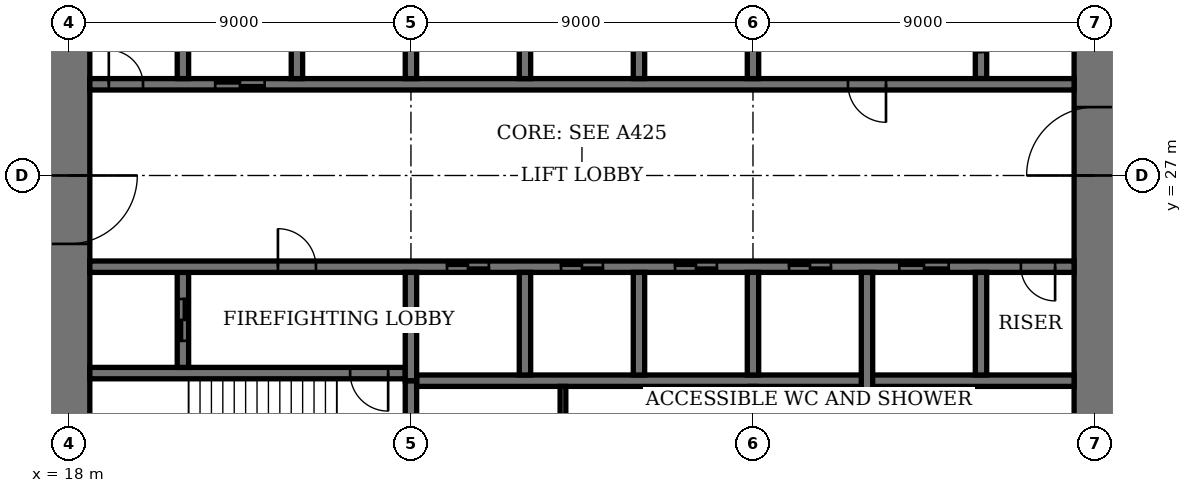
"""IFC4 building model, lengths in metres.
Left out: names, types, materials, properties, quantities, classifications, styles, units other than length and angle.
Written with IfcOpenShell. Run it as: python <this file> out.ifc"""

import sys

from ifc_helpers import new_model, si_unit, direction, frame, frame_2d, origin, place, context, subcontext, project, spatial, rectangle, extrude, element, fill, save


model = new_model("IFC4")
c1 = context("Model", 3, precision=1e-05, world=origin(), true_north=direction((0.0, 1.0)))
c2 = subcontext(c1, "Body", "Model", "MODEL_VIEW")
j1 = project(units=[si_unit("LENGTHUNIT", "METRE"), si_unit("PLANEANGLEUNIT", "RADIAN")], contexts=[c1])
p1 = place(None, origin())
s1 = spatial("IfcSite", under=j1, at=p1, CompositionType="ELEMENT")
p2 = place(p1, origin())
s2 = spatial("IfcBuilding", under=s1, at=p2, CompositionType="ELEMENT")
p3 = place(p2, frame((0.0, 0.0, 19.8)))
s3 = spatial("IfcBuildingStorey", under=s2, at=p3, CompositionType="ELEMENT", Elevation=19.8)
p4 = place(p3, frame((18.0, 35.45, 0.0), z_axis=(0.0, 0.0, 1.0), x_axis=(0.0, -1.0, 0.0)))
e1 = element("IfcWall", 1, at=p4, inside=s3, PredefinedType="SHEAR", context=c2, shape_type="SweptSolid", body=[
    extrude(rectangle(XDim=16.9, YDim=1.1, at=frame_2d((8.45, 0.0))), origin(), (0.0, 0.0, 1.0), 4.0),
])
p5 = place(p4, frame((8.45, 0.0, 0.0)))
e2 = element("IfcOpeningElement", 2, at=p5, cuts=e1, PredefinedType="OPENING", context=c2, shape_type="SweptSolid", body=[
    extrude(rectangle(XDim=1.8, YDim=2.4, at=frame_2d((0.9, 1.2))), frame((0.0, 0.56, 0.0), z_axis=(0.0, -1.0, 0.0), x_axis=(1.0, 0.0, 0.0)), (0.0, 0.0, 1.0), 1.12),
])
p6 = place(p3, frame((45.0, 18.55, 0.0), z_axis=(0.0, 0.0, 1.0), x_axis=(0.0, 1.0, 0.0)))
e3 = element("IfcWall", 3, at=p6, inside=s3, PredefinedType="SHEAR", context=c2, shape_type="SweptSolid", body=[
    extrude(rectangle(XDim=16.9, YDim=1.1, at=frame_2d((8.45, 0.0))), origin(), (0.0, 0.0, 1.0), 4.0),
])
p7 = place(p6, frame((8.45, 0.0, 0.0)))
e4 = element("IfcOpeningElement", 4, at=p7, cuts=e3, PredefinedType="OPENING", context=c2, shape_type="SweptSolid", body=[
    extrude(rectangle(XDim=1.8, YDim=2.4, at=frame_2d((0.9, 1.2))), frame((0.0, 0.56, 0.0), z_axis=(0.0, -1.0, 0.0), x_axis=(1.0, 0.0, 0.0)), (0.0, 0.0, 1.0), 1.12),
])
p8 = place(p3, frame((18.55, 21.8, 0.0), z_axis=(0.0, 0.0, 1.0), x_axis=(1.0, 0.0, 0.0)))
e5 = element("IfcWall", 5, at=p8, inside=s3, PredefinedType="SHEAR", context=c2, shape_type="SweptSolid", body=[
    extrude(rectangle(XDim=8.3, YDim=0.3, at=frame_2d((4.15, 0.0))), origin(), (0.0, 0.0, 1.0), 4.0),
])
p9 = place(p8, frame((6.85, 0.0, 0.0)))
e6 = element("IfcOpeningElement", 6, at=p9, cuts=e5, PredefinedType="OPENING", context=c2, shape_type="SweptSolid", body=[
    extrude(rectangle(XDim=1.0, YDim=2.4, at=frame_2d((0.5, 1.2))), frame((0.0, 0.16, 0.0), z_axis=(0.0, -1.0, 0.0), x_axis=(1.0, 0.0, 0.0)), (0.0, 0.0, 1.0), 0.32),
])
p10 = place(p3, frame((27.0, 18.55, 0.0), z_axis=(0.0, 0.0, 1.0), x_axis=(0.0, 1.0, 0.0)))
e7 = element("IfcWall", 7, at=p10, inside=s3, PredefinedType="SHEAR", context=c2, shape_type="SweptSolid", body=[
    extrude(rectangle(XDim=3.05, YDim=0.3, at=frame_2d((1.525, 0.0))), origin(), (0.0, 0.0, 1.0), 4.0),
])
p11 = place(p3, frame((21.0, 21.95, 0.0), z_axis=(0.0, 0.0, 1.0), x_axis=(0.0, 1.0, 0.0)))
e8 = element("IfcWall", 8, at=p11, inside=s3, PredefinedType="SHEAR", context=c2, shape_type="SweptSolid", body=[
    extrude(rectangle(XDim=2.5, YDim=0.3, at=frame_2d((1.25, 0.0))), origin(), (0.0, 0.0, 1.0), 4.0),
])
p12 = place(p11, frame((0.7, 0.0, 0.0)))
e9 = element("IfcOpeningElement", 9, at=p12, cuts=e8, PredefinedType="OPENING", context=c2, shape_type="SweptSolid", body=[
    extrude(rectangle(XDim=1.1, YDim=2.4, at=frame_2d((0.55, 1.2))), frame((0.0, 0.16, 0.0), z_axis=(0.0, -1.0, 0.0), x_axis=(1.0, 0.0, 0.0)), (0.0, 0.0, 1.0), 0.32),
])
p13 = place(p3, frame((42.0, 29.55, 0.0), z_axis=(0.0, 0.0, 1.0), x_axis=(0.0, 1.0, 0.0)))
e10 = element("IfcWall", 10, at=p13, inside=s3, PredefinedType="SHEAR", context=c2, shape_type="SweptSolid", body=[
    extrude(rectangle(XDim=2.5, YDim=0.3, at=frame_2d((1.25, 0.0))), origin(), (0.0, 0.0, 1.0), 4.0),
])
p14 = place(p13, frame((0.7, 0.0, 0.0)))
e11 = element("IfcOpeningElement", 11, at=p14, cuts=e10, PredefinedType="OPENING", context=c2, shape_type="SweptSolid", body=[
    extrude(rectangle(XDim=1.1, YDim=2.4, at=frame_2d((0.55, 1.2))), frame((0.0, 0.16, 0.0), z_axis=(0.0, -1.0, 0.0), x_axis=(1.0, 0.0, 0.0)), (0.0, 0.0, 1.0), 0.32),
])
p15 = place(p3, frame((18.55, 24.6, 0.0), z_axis=(0.0, 0.0, 1.0), x_axis=(1.0, 0.0, 0.0)))
e12 = element("IfcWall", 12, at=p15, inside=s3, PredefinedType="SHEAR", context=c2, shape_type="SweptSolid", body=[
    extrude(rectangle(XDim=25.9, YDim=0.3, at=frame_2d((12.95, 0.0))), origin(), (0.0, 0.0, 1.0), 4.0),
])
p16 = place(p15, frame((4.95, 0.0, 0.0)))
e13 = element("IfcOpeningElement", 13, at=p16, cuts=e12, PredefinedType="OPENING", context=c2, shape_type="SweptSolid", body=[
    extrude(rectangle(XDim=1.0, YDim=2.4, at=frame_2d((0.5, 1.2))), frame((0.0, 0.16, 0.0), z_axis=(0.0, -1.0, 0.0), x_axis=(1.0, 0.0, 0.0)), (0.0, 0.0, 1.0), 0.32),
])
p17 = place(p15, frame((24.5, 0.0, 0.0)))
e14 = element("IfcOpeningElement", 14, at=p17, cuts=e12, PredefinedType="OPENING", context=c2, shape_type="SweptSolid", body=[
    extrude(rectangle(XDim=0.9, YDim=2.1, at=frame_2d((0.45, 1.05))), frame((0.0, 0.16, 0.0), z_axis=(0.0, -1.0, 0.0), x_axis=(1.0, 0.0, 0.0)), (0.0, 0.0, 1.0), 0.32),
])
p18 = place(p15, frame((9.4, 0.0, 0.0)))
e15 = element("IfcOpeningElement", 15, at=p18, cuts=e12, PredefinedType="OPENING", context=c2, shape_type="SweptSolid", body=[
    extrude(rectangle(XDim=1.1, YDim=2.4, at=frame_2d((0.55, 1.2))), frame((0.0, 0.16, 0.0), z_axis=(0.0, -1.0, 0.0), x_axis=(1.0, 0.0, 0.0)), (0.0, 0.0, 1.0), 0.32),
])
p19 = place(p15, frame((12.4, 0.0, 0.0)))
e16 = element("IfcOpeningElement", 16, at=p19, cuts=e12, PredefinedType="OPENING", context=c2, shape_type="SweptSolid", body=[
    extrude(rectangle(XDim=1.1, YDim=2.4, at=frame_2d((0.55, 1.2))), frame((0.0, 0.16, 0.0), z_axis=(0.0, -1.0, 0.0), x_axis=(1.0, 0.0, 0.0)), (0.0, 0.0, 1.0), 0.32),
])
p20 = place(p15, frame((15.4, 0.0, 0.0)))
e17 = element("IfcOpeningElement", 17, at=p20, cuts=e12, PredefinedType="OPENING", context=c2, shape_type="SweptSolid", body=[
    extrude(rectangle(XDim=1.1, YDim=2.4, at=frame_2d((0.55, 1.2))), frame((0.0, 0.16, 0.0), z_axis=(0.0, -1.0, 0.0), x_axis=(1.0, 0.0, 0.0)), (0.0, 0.0, 1.0), 0.32),
])
p21 = place(p15, frame((18.4, 0.0, 0.0)))
e18 = element("IfcOpeningElement", 18, at=p21, cuts=e12, PredefinedType="OPENING", context=c2, shape_type="SweptSolid", body=[
    extrude(rectangle(XDim=1.1, YDim=2.4, at=frame_2d((0.55, 1.2))), frame((0.0, 0.16, 0.0), z_axis=(0.0, -1.0, 0.0), x_axis=(1.0, 0.0, 0.0)), (0.0, 0.0, 1.0), 0.32),
])
p22 = place(p15, frame((21.3, 0.0, 0.0)))
e19 = element("IfcOpeningElement", 19, at=p22, cuts=e12, PredefinedType="OPENING", context=c2, shape_type="SweptSolid", body=[
    extrude(rectangle(XDim=1.3, YDim=2.4, at=frame_2d((0.65, 1.2))), frame((0.0, 0.16, 0.0), z_axis=(0.0, -1.0, 0.0), x_axis=(1.0, 0.0, 0.0)), (0.0, 0.0, 1.0), 0.32),
])
p23 = place(p3, frame((18.55, 29.4, 0.0), z_axis=(0.0, 0.0, 1.0), x_axis=(1.0, 0.0, 0.0)))
e20 = element("IfcWall", 20, at=p23, inside=s3, PredefinedType="SHEAR", context=c2, shape_type="SweptSolid", body=[
    extrude(rectangle(XDim=25.9, YDim=0.3, at=frame_2d((12.95, 0.0))), origin(), (0.0, 0.0, 1.0), 4.0),
])
p24 = place(p23, frame((19.95, 0.0, 0.0)))
e21 = element("IfcOpeningElement", 21, at=p24, cuts=e20, PredefinedType="OPENING", context=c2, shape_type="SweptSolid", body=[
    extrude(rectangle(XDim=1.0, YDim=2.4, at=frame_2d((0.5, 1.2))), frame((0.0, 0.16, 0.0), z_axis=(0.0, -1.0, 0.0), x_axis=(1.0, 0.0, 0.0)), (0.0, 0.0, 1.0), 0.32),
])
p25 = place(p23, frame((0.5, 0.0, 0.0)))
e22 = element("IfcOpeningElement", 22, at=p25, cuts=e20, PredefinedType="OPENING", context=c2, shape_type="SweptSolid", body=[
    extrude(rectangle(XDim=0.9, YDim=2.1, at=frame_2d((0.45, 1.05))), frame((0.0, 0.16, 0.0), z_axis=(0.0, -1.0, 0.0), x_axis=(1.0, 0.0, 0.0)), (0.0, 0.0, 1.0), 0.32),
])
p26 = place(p23, frame((3.3, 0.0, 0.0)))
e23 = element("IfcOpeningElement", 23, at=p26, cuts=e20, PredefinedType="OPENING", context=c2, shape_type="SweptSolid", body=[
    extrude(rectangle(XDim=1.3, YDim=2.4, at=frame_2d((0.65, 1.2))), frame((0.0, 0.16, 0.0), z_axis=(0.0, -1.0, 0.0), x_axis=(1.0, 0.0, 0.0)), (0.0, 0.0, 1.0), 0.32),
])
p27 = place(p3, frame((27.15, 21.6, 0.0), z_axis=(0.0, 0.0, 1.0), x_axis=(1.0, 0.0, 0.0)))
e24 = element("IfcWall", 24, at=p27, inside=s3, PredefinedType="SHEAR", context=c2, shape_type="SweptSolid", body=[
    extrude(rectangle(XDim=17.3, YDim=0.3, at=frame_2d((8.65, 0.0))), origin(), (0.0, 0.0, 1.0), 4.0),
])
for number, where, z_axis, x_axis in (
    (25, (30.0, 21.75, 0.0), (0.0, 0.0, 1.0), (0.0, 1.0, 0.0)),
    (26, (33.0, 29.55, 0.0), (0.0, 0.0, 1.0), (0.0, 1.0, 0.0)),
    (27, (33.0, 21.75, 0.0), (0.0, 0.0, 1.0), (0.0, 1.0, 0.0)),
    (28, (30.0, 29.55, 0.0), (0.0, 0.0, 1.0), (0.0, 1.0, 0.0)),
    (29, (36.0, 21.75, 0.0), (0.0, 0.0, 1.0), (0.0, 1.0, 0.0)),
    (30, (27.0, 29.55, 0.0), (0.0, 0.0, 1.0), (0.0, 1.0, 0.0)),
):
    element("IfcWall", number, at=place(p3, frame(where, z_axis=z_axis, x_axis=x_axis)), inside=s3, PredefinedType="SHEAR", context=c2, shape_type="SweptSolid", body=[
        extrude(rectangle(XDim=2.7, YDim=0.3, at=frame_2d((1.35, 0.0))), origin(), (0.0, 0.0, 1.0), 4.0),
    ])
for number, where, z_axis, x_axis in (
    (31, (39.0, 18.55, 0.0), (0.0, 0.0, 1.0), (0.0, 1.0, 0.0)),
    (32, (24.0, 29.55, 0.0), (0.0, 0.0, 1.0), (0.0, 1.0, 0.0)),
):
    element("IfcWall", number, at=place(p3, frame(where, z_axis=z_axis, x_axis=x_axis)), inside=s3, PredefinedType="SHEAR", context=c2, shape_type="SweptSolid", body=[
        extrude(rectangle(XDim=5.9, YDim=0.3, at=frame_2d((2.95, 0.0))), origin(), (0.0, 0.0, 1.0), 4.0),
    ])
for number, where, z_axis, x_axis in (
    (33, (42.0, 21.75, 0.0), (0.0, 0.0, 1.0), (0.0, 1.0, 0.0)),
    (34, (21.0, 29.55, 0.0), (0.0, 0.0, 1.0), (0.0, 1.0, 0.0)),
):
    element("IfcWall", number, at=place(p3, frame(where, z_axis=z_axis, x_axis=x_axis)), inside=s3, PredefinedType="SHEAR", context=c2, shape_type="SweptSolid", body=[
        extrude(rectangle(XDim=2.7, YDim=0.3, at=frame_2d((1.35, 0.0))), origin(), (0.0, 0.0, 1.0), 4.0),
    ])
for number, where, z_axis, x_axis in (
    (35, (27.0, 21.6, 0.0), (0.0, 0.0, 1.0), (0.0, 1.0, 0.0)),
    (36, (36.0, 29.55, 0.0), (0.0, 0.0, 1.0), (0.0, 1.0, 0.0)),
):
    element("IfcWall", number, at=place(p3, frame(where, z_axis=z_axis, x_axis=x_axis)), inside=s3, PredefinedType="SHEAR", context=c2, shape_type="SweptSolid", body=[
        extrude(rectangle(XDim=2.85, YDim=0.3, at=frame_2d((1.425, 0.0))), origin(), (0.0, 0.0, 1.0), 4.0),
    ])
for number, where, z_axis, x_axis in (
    (37, (31.0, 18.55, 0.0), (0.0, 0.0, 1.0), (0.0, 1.0, 0.0)),
    (38, (36.0, 18.55, 0.0), (0.0, 0.0, 1.0), (0.0, 1.0, 0.0)),
):
    element("IfcWall", number, at=place(p3, frame(where, z_axis=z_axis, x_axis=x_axis)), inside=s3, PredefinedType="PARTITIONING", context=c2, shape_type="SweptSolid", body=[
        extrude(rectangle(XDim=2.9, YDim=0.15, at=frame_2d((1.45, 0.0))), origin(), (0.0, 0.0, 1.0), 3.75),
    ])
p28 = place(p5, origin())
e39 = element("IfcDoor", 39, at=p28, inside=s3, OperationType="DOUBLE_DOOR_DOUBLE_SWING", PredefinedType="DOOR", context=c2, shape_type="SweptSolid", body=[
    extrude(rectangle(XDim=1.8, YDim=2.4, at=frame_2d((0.9, 1.2))), frame((0.0, 0.03, 0.0), z_axis=(0.0, -1.0, 0.0), x_axis=(1.0, 0.0, 0.0)), (0.0, 0.0, 1.0), 0.06),
    extrude(rectangle(XDim=0.04, YDim=2.4, at=frame_2d((0.02, 1.2))), frame((0.0, 0.55, 0.0), z_axis=(0.0, -1.0, 0.0), x_axis=(1.0, 0.0, 0.0)), (0.0, 0.0, 1.0), 1.1),
    extrude(rectangle(XDim=0.04, YDim=2.4, at=frame_2d((1.78, 1.2))), frame((0.0, 0.55, 0.0), z_axis=(0.0, -1.0, 0.0), x_axis=(1.0, 0.0, 0.0)), (0.0, 0.0, 1.0), 1.1),
    extrude(rectangle(XDim=1.8, YDim=0.04, at=frame_2d((0.9, 2.38))), frame((0.0, 0.55, 0.0), z_axis=(0.0, -1.0, 0.0), x_axis=(1.0, 0.0, 0.0)), (0.0, 0.0, 1.0), 1.1),
])
fill(e2, e39)
p29 = place(p7, origin())
e40 = element("IfcDoor", 40, at=p29, inside=s3, OperationType="DOUBLE_DOOR_DOUBLE_SWING", PredefinedType="DOOR", context=c2, shape_type="SweptSolid", body=[
    extrude(rectangle(XDim=1.8, YDim=2.4, at=frame_2d((0.9, 1.2))), frame((0.0, 0.03, 0.0), z_axis=(0.0, -1.0, 0.0), x_axis=(1.0, 0.0, 0.0)), (0.0, 0.0, 1.0), 0.06),
    extrude(rectangle(XDim=0.04, YDim=2.4, at=frame_2d((0.02, 1.2))), frame((0.0, 0.55, 0.0), z_axis=(0.0, -1.0, 0.0), x_axis=(1.0, 0.0, 0.0)), (0.0, 0.0, 1.0), 1.1),
    extrude(rectangle(XDim=0.04, YDim=2.4, at=frame_2d((1.78, 1.2))), frame((0.0, 0.55, 0.0), z_axis=(0.0, -1.0, 0.0), x_axis=(1.0, 0.0, 0.0)), (0.0, 0.0, 1.0), 1.1),
    extrude(rectangle(XDim=1.8, YDim=0.04, at=frame_2d((0.9, 2.38))), frame((0.0, 0.55, 0.0), z_axis=(0.0, -1.0, 0.0), x_axis=(1.0, 0.0, 0.0)), (0.0, 0.0, 1.0), 1.1),
])
fill(e4, e40)
p30 = place(p9, origin())
e41 = element("IfcDoor", 41, at=p30, inside=s3, OperationType="SINGLE_SWING_RIGHT", PredefinedType="DOOR", context=c2, shape_type="SweptSolid", body=[
    extrude(rectangle(XDim=1.0, YDim=2.4, at=frame_2d((0.5, 1.2))), frame((0.0, 0.03, 0.0), z_axis=(0.0, -1.0, 0.0), x_axis=(1.0, 0.0, 0.0)), (0.0, 0.0, 1.0), 0.06),
])
fill(e6, e41)
p31 = place(p16, origin())
e42 = element("IfcDoor", 42, at=p31, inside=s3, OperationType="SINGLE_SWING_RIGHT", PredefinedType="DOOR", context=c2, shape_type="SweptSolid", body=[
    extrude(rectangle(XDim=1.0, YDim=2.4, at=frame_2d((0.5, 1.2))), frame((0.0, 0.03, 0.0), z_axis=(0.0, -1.0, 0.0), x_axis=(1.0, 0.0, 0.0)), (0.0, 0.0, 1.0), 0.06),
])
fill(e13, e42)
p32 = place(p24, origin())
e43 = element("IfcDoor", 43, at=p32, inside=s3, OperationType="SINGLE_SWING_RIGHT", PredefinedType="DOOR", context=c2, shape_type="SweptSolid", body=[
    extrude(rectangle(XDim=1.0, YDim=2.4, at=frame_2d((0.5, 1.2))), frame((0.0, 0.03, 0.0), z_axis=(0.0, -1.0, 0.0), x_axis=(1.0, 0.0, 0.0)), (0.0, 0.0, 1.0), 0.06),
])
fill(e21, e43)
p33 = place(p17, origin())
e44 = element("IfcDoor", 44, at=p33, inside=s3, OperationType="SINGLE_SWING_RIGHT", PredefinedType="DOOR", context=c2, shape_type="SweptSolid", body=[
    extrude(rectangle(XDim=0.9, YDim=2.1, at=frame_2d((0.45, 1.05))), frame((0.0, 0.03, 0.0), z_axis=(0.0, -1.0, 0.0), x_axis=(1.0, 0.0, 0.0)), (0.0, 0.0, 1.0), 0.06),
])
fill(e14, e44)
p34 = place(p25, origin())
e45 = element("IfcDoor", 45, at=p34, inside=s3, OperationType="SINGLE_SWING_RIGHT", PredefinedType="DOOR", context=c2, shape_type="SweptSolid", body=[
    extrude(rectangle(XDim=0.9, YDim=2.1, at=frame_2d((0.45, 1.05))), frame((0.0, 0.03, 0.0), z_axis=(0.0, -1.0, 0.0), x_axis=(1.0, 0.0, 0.0)), (0.0, 0.0, 1.0), 0.06),
])
fill(e22, e45)
p35 = place(p18, origin())
e46 = element("IfcDoor", 46, at=p35, inside=s3, OperationType="DOUBLE_DOOR_SLIDING", PredefinedType="DOOR", context=c2, shape_type="SweptSolid", body=[
    extrude(rectangle(XDim=1.1, YDim=2.4, at=frame_2d((0.55, 1.2))), frame((0.0, 0.02, 0.0), z_axis=(0.0, -1.0, 0.0), x_axis=(1.0, 0.0, 0.0)), (0.0, 0.0, 1.0), 0.04),
])
fill(e15, e46)
p36 = place(p19, origin())
e47 = element("IfcDoor", 47, at=p36, inside=s3, OperationType="DOUBLE_DOOR_SLIDING", PredefinedType="DOOR", context=c2, shape_type="SweptSolid", body=[
    extrude(rectangle(XDim=1.1, YDim=2.4, at=frame_2d((0.55, 1.2))), frame((0.0, 0.02, 0.0), z_axis=(0.0, -1.0, 0.0), x_axis=(1.0, 0.0, 0.0)), (0.0, 0.0, 1.0), 0.04),
])
fill(e16, e47)
p37 = place(p20, origin())
e48 = element("IfcDoor", 48, at=p37, inside=s3, OperationType="DOUBLE_DOOR_SLIDING", PredefinedType="DOOR", context=c2, shape_type="SweptSolid", body=[
    extrude(rectangle(XDim=1.1, YDim=2.4, at=frame_2d((0.55, 1.2))), frame((0.0, 0.02, 0.0), z_axis=(0.0, -1.0, 0.0), x_axis=(1.0, 0.0, 0.0)), (0.0, 0.0, 1.0), 0.04),
])
fill(e17, e48)
p38 = place(p21, origin())
e49 = element("IfcDoor", 49, at=p38, inside=s3, OperationType="DOUBLE_DOOR_SLIDING", PredefinedType="DOOR", context=c2, shape_type="SweptSolid", body=[
    extrude(rectangle(XDim=1.1, YDim=2.4, at=frame_2d((0.55, 1.2))), frame((0.0, 0.02, 0.0), z_axis=(0.0, -1.0, 0.0), x_axis=(1.0, 0.0, 0.0)), (0.0, 0.0, 1.0), 0.04),
])
fill(e18, e49)
p39 = place(p22, origin())
e50 = element("IfcDoor", 50, at=p39, inside=s3, OperationType="DOUBLE_DOOR_SLIDING", PredefinedType="DOOR", context=c2, shape_type="SweptSolid", body=[
    extrude(rectangle(XDim=1.3, YDim=2.4, at=frame_2d((0.65, 1.2))), frame((0.0, 0.02, 0.0), z_axis=(0.0, -1.0, 0.0), x_axis=(1.0, 0.0, 0.0)), (0.0, 0.0, 1.0), 0.04),
])
fill(e19, e50)
p40 = place(p26, origin())
e51 = element("IfcDoor", 51, at=p40, inside=s3, OperationType="DOUBLE_DOOR_SLIDING", PredefinedType="DOOR", context=c2, shape_type="SweptSolid", body=[
    extrude(rectangle(XDim=1.3, YDim=2.4, at=frame_2d((0.65, 1.2))), frame((0.0, 0.02, 0.0), z_axis=(0.0, -1.0, 0.0), x_axis=(1.0, 0.0, 0.0)), (0.0, 0.0, 1.0), 0.04),
])
fill(e23, e51)
p41 = place(p12, origin())
e52 = element("IfcDoor", 52, at=p41, inside=s3, OperationType="DOUBLE_DOOR_SLIDING", PredefinedType="DOOR", context=c2, shape_type="SweptSolid", body=[
    extrude(rectangle(XDim=1.1, YDim=2.4, at=frame_2d((0.55, 1.2))), frame((0.0, 0.03, 0.0), z_axis=(0.0, -1.0, 0.0), x_axis=(1.0, 0.0, 0.0)), (0.0, 0.0, 1.0), 0.06),
])
fill(e9, e52)
save(model, sys.argv[1])
